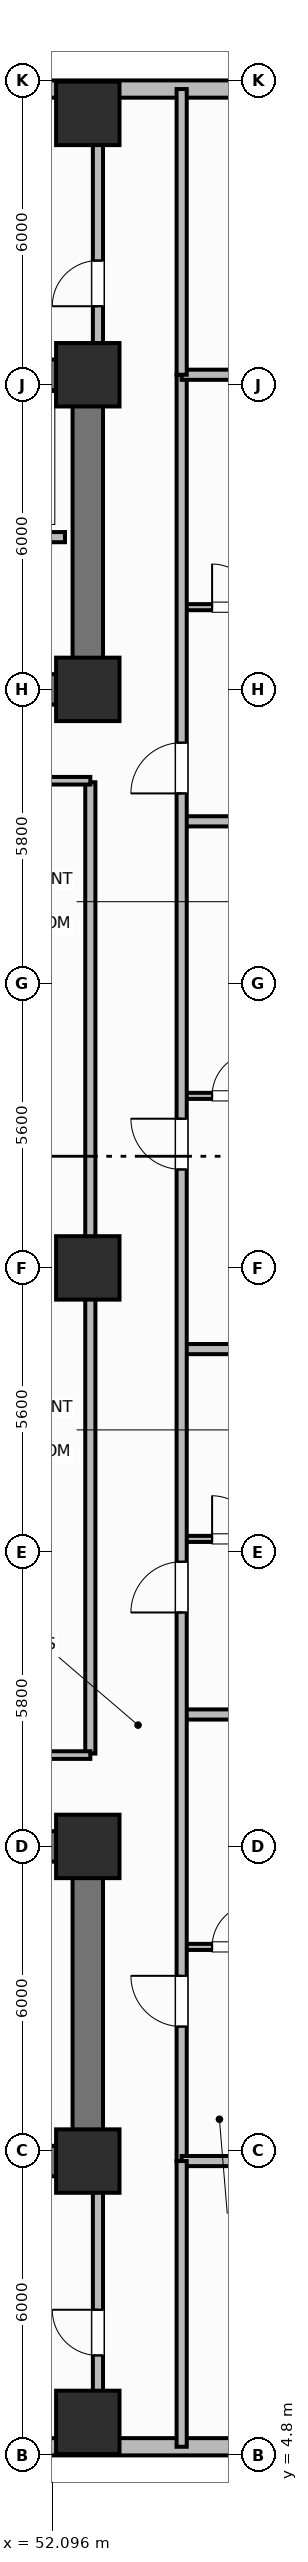
"""IFC4 building model, lengths in metres.
Left out: names, types, materials, properties, quantities, classifications, styles, units other than length and angle.
Written with IfcOpenShell. Run it as: python <this file> out.ifc"""

import sys

from ifc_helpers import new_model, si_unit, direction, frame, frame_2d, origin, origin_2d, place, context, subcontext, project, spatial, rectangle, extrude, element, fill, save


model = new_model("IFC4")
c1 = context("Model", 3, precision=1e-05, world=origin(), true_north=direction((0.0, 1.0)))
c2 = subcontext(c1, "Body", "Model", "MODEL_VIEW")
j1 = project(units=[si_unit("LENGTHUNIT", "METRE"), si_unit("PLANEANGLEUNIT", "RADIAN")], contexts=[c1])
p1 = place(None, origin())
s1 = spatial("IfcSite", under=j1, at=p1, CompositionType="ELEMENT")
p2 = place(p1, origin())
s2 = spatial("IfcBuilding", under=s1, at=p2, CompositionType="ELEMENT")
p3 = place(p2, frame((0.0, 0.0, 65.8)))
s3 = spatial("IfcBuildingStorey", under=s2, at=p3, CompositionType="ELEMENT", Elevation=65.8)
p4 = place(p3, frame((52.8, 10.6, 0.0), z_axis=(0.0, 0.0, 1.0), x_axis=(-1.0, 0.0, 0.0)))
e1 = element("IfcWall", 1, at=p4, inside=s3, PredefinedType="SHEAR", context=c2, shape_type="SweptSolid", body=[
    extrude(rectangle(XDim=27.2, YDim=0.6, at=frame_2d((13.6, 0.0))), origin(), (0.0, 0.0, 1.0), 3.7),
])
p5 = place(p3, frame((52.8, 10.9, 0.0), z_axis=(0.0, 0.0, 1.0), x_axis=(0.0, 1.0, 0.0)))
e2 = element("IfcWall", 2, at=p5, inside=s3, PredefinedType="SHEAR", context=c2, shape_type="SweptSolid", body=[
    extrude(rectangle(XDim=5.6, YDim=0.6, at=frame_2d((2.8, 0.0))), origin(), (0.0, 0.0, 1.0), 3.7),
])
p6 = place(p3, frame((25.6, 16.8, 0.0), z_axis=(0.0, 0.0, 1.0), x_axis=(1.0, 0.0, 0.0)))
e3 = element("IfcWall", 3, at=p6, inside=s3, PredefinedType="SHEAR", context=c2, shape_type="SweptSolid", body=[
    extrude(rectangle(XDim=27.2, YDim=0.6, at=frame_2d((13.6, 0.0))), origin(), (0.0, 0.0, 1.0), 3.7),
])
p7 = place(p6, frame((1.9, 0.0, 0.0)))
e4 = element("IfcOpeningElement", 4, at=p7, cuts=e3, PredefinedType="OPENING", context=c2, shape_type="SweptSolid", body=[
    extrude(rectangle(XDim=1.1, YDim=2.15, at=frame_2d((0.55, 1.075))), frame((0.0, 0.31, 0.0), z_axis=(0.0, -1.0, 0.0), x_axis=(1.0, 0.0, 0.0)), (0.0, 0.0, 1.0), 0.62),
])
p8 = place(p6, frame((13.0, 0.0, 0.0)))
e5 = element("IfcOpeningElement", 5, at=p8, cuts=e3, PredefinedType="OPENING", context=c2, shape_type="SweptSolid", body=[
    extrude(rectangle(XDim=1.2, YDim=2.15, at=frame_2d((0.6, 1.075))), frame((0.0, 0.31, 0.0), z_axis=(0.0, -1.0, 0.0), x_axis=(1.0, 0.0, 0.0)), (0.0, 0.0, 1.0), 0.62),
])
p9 = place(p6, frame((20.4, 0.0, 0.0)))
e6 = element("IfcOpeningElement", 6, at=p9, cuts=e3, PredefinedType="OPENING", context=c2, shape_type="SweptSolid", body=[
    extrude(rectangle(XDim=1.3, YDim=2.2, at=frame_2d((0.65, 1.1))), frame((0.0, 0.31, 0.0), z_axis=(0.0, -1.0, 0.0), x_axis=(1.0, 0.0, 0.0)), (0.0, 0.0, 1.0), 0.62),
])
p10 = place(p6, frame((24.65, 0.0, 0.0)))
e7 = element("IfcOpeningElement", 7, at=p10, cuts=e3, PredefinedType="OPENING", context=c2, shape_type="SweptSolid", body=[
    extrude(rectangle(XDim=0.85, YDim=2.1, at=frame_2d((0.425, 1.05))), frame((0.0, 0.31, 0.0), z_axis=(0.0, -1.0, 0.0), x_axis=(1.0, 0.0, 0.0)), (0.0, 0.0, 1.0), 0.62),
])
p11 = place(p3, frame((25.6, 45.8, 0.0), z_axis=(0.0, 0.0, 1.0), x_axis=(1.0, 0.0, 0.0)))
e8 = element("IfcWall", 8, at=p11, inside=s3, PredefinedType="SHEAR", context=c2, shape_type="SweptSolid", body=[
    extrude(rectangle(XDim=27.2, YDim=0.6, at=frame_2d((13.6, 0.0))), origin(), (0.0, 0.0, 1.0), 3.7),
])
p12 = place(p3, frame((52.8, 39.9, 0.0), z_axis=(0.0, 0.0, 1.0), x_axis=(0.0, 1.0, 0.0)))
e9 = element("IfcWall", 9, at=p12, inside=s3, PredefinedType="SHEAR", context=c2, shape_type="SweptSolid", body=[
    extrude(rectangle(XDim=5.6, YDim=0.6, at=frame_2d((2.8, 0.0))), origin(), (0.0, 0.0, 1.0), 3.7),
])
p13 = place(p3, frame((52.8, 39.6, 0.0), z_axis=(0.0, 0.0, 1.0), x_axis=(-1.0, 0.0, 0.0)))
e10 = element("IfcWall", 10, at=p13, inside=s3, PredefinedType="SHEAR", context=c2, shape_type="SweptSolid", body=[
    extrude(rectangle(XDim=27.2, YDim=0.6, at=frame_2d((13.6, 0.0))), origin(), (0.0, 0.0, 1.0), 3.7),
])
p14 = place(p13, frame((24.2, 0.0, 0.0)))
e11 = element("IfcOpeningElement", 11, at=p14, cuts=e10, PredefinedType="OPENING", context=c2, shape_type="SweptSolid", body=[
    extrude(rectangle(XDim=1.1, YDim=2.15, at=frame_2d((0.55, 1.075))), frame((0.0, 0.31, 0.0), z_axis=(0.0, -1.0, 0.0), x_axis=(1.0, 0.0, 0.0)), (0.0, 0.0, 1.0), 0.62),
])
p15 = place(p13, frame((15.1, 0.0, 0.0)))
e12 = element("IfcOpeningElement", 12, at=p15, cuts=e10, PredefinedType="OPENING", context=c2, shape_type="SweptSolid", body=[
    extrude(rectangle(XDim=1.2, YDim=2.15, at=frame_2d((0.6, 1.075))), frame((0.0, 0.31, 0.0), z_axis=(0.0, -1.0, 0.0), x_axis=(1.0, 0.0, 0.0)), (0.0, 0.0, 1.0), 0.62),
])
p16 = place(p13, frame((11.6, 0.0, 0.0)))
e13 = element("IfcOpeningElement", 13, at=p16, cuts=e10, PredefinedType="OPENING", context=c2, shape_type="SweptSolid", body=[
    extrude(rectangle(XDim=0.9, YDim=2.1, at=frame_2d((0.45, 1.05))), frame((0.0, 0.31, 0.0), z_axis=(0.0, -1.0, 0.0), x_axis=(1.0, 0.0, 0.0)), (0.0, 0.0, 1.0), 0.62),
])
p17 = place(p13, frame((3.6, 0.0, 0.0)))
e14 = element("IfcOpeningElement", 14, at=p17, cuts=e10, PredefinedType="OPENING", context=c2, shape_type="SweptSolid", body=[
    extrude(rectangle(XDim=1.0, YDim=2.15, at=frame_2d((0.5, 1.075))), frame((0.0, 0.31, 0.0), z_axis=(0.0, -1.0, 0.0), x_axis=(1.0, 0.0, 0.0)), (0.0, 0.0, 1.0), 0.62),
])
for number, where, z_axis, x_axis in (
    (15, (52.8, 10.6, 0.0), (0.0, 0.0, 1.0), (1.0, 0.0, 0.0)),
    (16, (52.8, 16.8, 0.0), (0.0, 0.0, 1.0), (1.0, 0.0, 0.0)),
    (17, (52.8, 39.6, 0.0), (0.0, 0.0, 1.0), (1.0, 0.0, 0.0)),
    (18, (52.8, 45.8, 0.0), (0.0, 0.0, 1.0), (1.0, 0.0, 0.0)),
    (19, (52.8, 28.2, 0.0), (0.0, 0.0, 1.0), (1.0, 0.0, 0.0)),
    (20, (52.8, 5.45, 0.0), (0.0, 0.0, 1.0), (1.0, 0.0, 0.0)),
    (21, (52.8, 50.95, 0.0), (0.0, 0.0, 1.0), (1.0, 0.0, 0.0)),
):
    element("IfcColumn", number, at=place(p3, frame(where, z_axis=z_axis, x_axis=x_axis)), inside=s3, PredefinedType="COLUMN", context=c2, shape_type="SweptSolid", body=[
        extrude(rectangle(XDim=1.25, YDim=1.25, at=origin_2d()), origin(), (0.0, 0.0, 1.0), 3.7),
    ])
p18 = place(p3, frame((42.4, 4.97, 0.0), z_axis=(0.0, 0.0, 1.0), x_axis=(1.0, 0.0, 0.0)))
e22 = element("IfcWall", 22, at=p18, inside=s3, PredefinedType="SOLIDWALL", context=c2, shape_type="SweptSolid", body=[
    extrude(rectangle(XDim=17.4, YDim=0.34, at=frame_2d((8.7, 0.0))), origin(), (0.0, 0.0, 1.0), 2.7),
])
p19 = place(p18, frame((2.16, 0.0, 0.68)))
e23 = element("IfcOpeningElement", 23, at=p19, cuts=e22, PredefinedType="OPENING", context=c2, shape_type="SweptSolid", body=[
    extrude(rectangle(XDim=1.6, YDim=1.9, at=frame_2d((0.8, 0.95))), frame((0.0, 0.18, 0.0), z_axis=(0.0, -1.0, 0.0), x_axis=(1.0, 0.0, 0.0)), (0.0, 0.0, 1.0), 0.36),
])
p20 = place(p18, frame((5.03, 0.0, 0.68)))
e24 = element("IfcOpeningElement", 24, at=p20, cuts=e22, PredefinedType="OPENING", context=c2, shape_type="SweptSolid", body=[
    extrude(rectangle(XDim=1.6, YDim=1.9, at=frame_2d((0.8, 0.95))), frame((0.0, 0.18, 0.0), z_axis=(0.0, -1.0, 0.0), x_axis=(1.0, 0.0, 0.0)), (0.0, 0.0, 1.0), 0.36),
])
p21 = place(p18, frame((7.55, 0.0, 0.68)))
e25 = element("IfcOpeningElement", 25, at=p21, cuts=e22, PredefinedType="OPENING", context=c2, shape_type="SweptSolid", body=[
    extrude(rectangle(XDim=1.6, YDim=1.9, at=frame_2d((0.8, 0.95))), frame((0.0, 0.18, 0.0), z_axis=(0.0, -1.0, 0.0), x_axis=(1.0, 0.0, 0.0)), (0.0, 0.0, 1.0), 0.36),
])
p22 = place(p18, frame((14.34, 0.0, 0.68)))
e26 = element("IfcOpeningElement", 26, at=p22, cuts=e22, PredefinedType="OPENING", context=c2, shape_type="SweptSolid", body=[
    extrude(rectangle(XDim=1.6, YDim=1.9, at=frame_2d((0.8, 0.95))), frame((0.0, 0.18, 0.0), z_axis=(0.0, -1.0, 0.0), x_axis=(1.0, 0.0, 0.0)), (0.0, 0.0, 1.0), 0.36),
])
p23 = place(p3, frame((59.8, 51.43, 0.0), z_axis=(0.0, 0.0, 1.0), x_axis=(-1.0, 0.0, 0.0)))
e27 = element("IfcWall", 27, at=p23, inside=s3, PredefinedType="SOLIDWALL", context=c2, shape_type="SweptSolid", body=[
    extrude(rectangle(XDim=17.4, YDim=0.34, at=frame_2d((8.7, 0.0))), origin(), (0.0, 0.0, 1.0), 2.7),
])
p24 = place(p23, frame((1.613, 0.0, 0.68)))
e28 = element("IfcOpeningElement", 28, at=p24, cuts=e27, PredefinedType="OPENING", context=c2, shape_type="SweptSolid", body=[
    extrude(rectangle(XDim=2.1, YDim=1.9, at=frame_2d((1.05, 0.95))), frame((0.0, 0.18, 0.0), z_axis=(0.0, -1.0, 0.0), x_axis=(1.0, 0.0, 0.0)), (0.0, 0.0, 1.0), 0.36),
])
p25 = place(p23, frame((9.663, 0.0, 0.68)))
e29 = element("IfcOpeningElement", 29, at=p25, cuts=e27, PredefinedType="OPENING", context=c2, shape_type="SweptSolid", body=[
    extrude(rectangle(XDim=2.1, YDim=1.9, at=frame_2d((1.05, 0.95))), frame((0.0, 0.18, 0.0), z_axis=(0.0, -1.0, 0.0), x_axis=(1.0, 0.0, 0.0)), (0.0, 0.0, 1.0), 0.36),
])
p26 = place(p23, frame((12.988, 0.0, 0.68)))
e30 = element("IfcOpeningElement", 30, at=p26, cuts=e27, PredefinedType="OPENING", context=c2, shape_type="SweptSolid", body=[
    extrude(rectangle(XDim=2.1, YDim=1.9, at=frame_2d((1.05, 0.95))), frame((0.0, 0.18, 0.0), z_axis=(0.0, -1.0, 0.0), x_axis=(1.0, 0.0, 0.0)), (0.0, 0.0, 1.0), 0.36),
])
p27 = place(p3, frame((52.35, 42.6, 0.0), z_axis=(0.0, 0.0, 1.0), x_axis=(-1.0, 0.0, 0.0)))
e31 = element("IfcWall", 31, at=p27, inside=s3, PredefinedType="PARTITIONING", context=c2, shape_type="SweptSolid", body=[
    extrude(rectangle(XDim=8.8, YDim=0.2, at=frame_2d((4.4, 0.0))), origin(), (0.0, 0.0, 1.0), 2.53),
])
p28 = place(p3, frame((52.85, 18.63, 0.0), z_axis=(0.0, 0.0, 1.0), x_axis=(0.0, 1.0, 0.0)))
e32 = element("IfcWall", 32, at=p28, inside=s3, PredefinedType="PARTITIONING", context=c2, shape_type="SweptSolid", body=[
    extrude(rectangle(XDim=19.14, YDim=0.2, at=frame_2d((9.57, 0.0))), origin(), (0.0, 0.0, 1.0), 2.53),
])
for number, where, z_axis, x_axis in (
    (33, (42.75, 18.6, 0.0), (0.0, 0.0, 1.0), (1.0, 0.0, 0.0)),
    (34, (42.75, 37.8, 0.0), (0.0, 0.0, 1.0), (1.0, 0.0, 0.0)),
):
    element("IfcWall", number, at=place(p3, frame(where, z_axis=z_axis, x_axis=x_axis)), inside=s3, PredefinedType="PARTITIONING", context=c2, shape_type="SweptSolid", body=[
        extrude(rectangle(XDim=10.1, YDim=0.15, at=frame_2d((5.05, 0.0))), origin(), (0.0, 0.0, 1.0), 2.53),
    ])
p29 = place(p3, frame((54.65, 14.82, 0.0), z_axis=(0.0, 0.0, 1.0), x_axis=(1.0, 0.0, 0.0)))
e35 = element("IfcWall", 35, at=p29, inside=s3, PredefinedType="PARTITIONING", context=c2, shape_type="SweptSolid", body=[
    extrude(rectangle(XDim=2.25, YDim=0.12, at=frame_2d((1.125, 0.0))), origin(), (0.0, 0.0, 1.0), 2.53),
])
p30 = place(p29, frame((0.6, 0.0, 0.0)))
e36 = element("IfcOpeningElement", 36, at=p30, cuts=e35, PredefinedType="OPENING", context=c2, shape_type="SweptSolid", body=[
    extrude(rectangle(XDim=0.85, YDim=2.1, at=frame_2d((0.425, 1.05))), frame((0.0, 0.07, 0.0), z_axis=(0.0, -1.0, 0.0), x_axis=(1.0, 0.0, 0.0)), (0.0, 0.0, 1.0), 0.14),
])
p31 = place(p3, frame((54.65, 19.4, 0.0), z_axis=(0.0, 0.0, 1.0), x_axis=(1.0, 0.0, 0.0)))
e37 = element("IfcWall", 37, at=p31, inside=s3, PredefinedType="PARTITIONING", context=c2, shape_type="SweptSolid", body=[
    extrude(rectangle(XDim=9.18, YDim=0.2, at=frame_2d((4.59, 0.0))), origin(), (0.0, 0.0, 1.0), 2.53),
])
p32 = place(p3, frame((54.65, 22.86, 0.0), z_axis=(0.0, 0.0, 1.0), x_axis=(1.0, 0.0, 0.0)))
e38 = element("IfcWall", 38, at=p32, inside=s3, PredefinedType="PARTITIONING", context=c2, shape_type="SweptSolid", body=[
    extrude(rectangle(XDim=2.25, YDim=0.12, at=frame_2d((1.125, 0.0))), origin(), (0.0, 0.0, 1.0), 2.53),
])
p33 = place(p32, frame((0.6, 0.0, 0.0)))
e39 = element("IfcOpeningElement", 39, at=p33, cuts=e38, PredefinedType="OPENING", context=c2, shape_type="SweptSolid", body=[
    extrude(rectangle(XDim=0.85, YDim=2.1, at=frame_2d((0.425, 1.05))), frame((0.0, 0.07, 0.0), z_axis=(0.0, -1.0, 0.0), x_axis=(1.0, 0.0, 0.0)), (0.0, 0.0, 1.0), 0.14),
])
p34 = place(p3, frame((54.65, 26.6, 0.0), z_axis=(0.0, 0.0, 1.0), x_axis=(1.0, 0.0, 0.0)))
e40 = element("IfcWall", 40, at=p34, inside=s3, PredefinedType="PARTITIONING", context=c2, shape_type="SweptSolid", body=[
    extrude(rectangle(XDim=8.78, YDim=0.2, at=frame_2d((4.39, 0.0))), origin(), (0.0, 0.0, 1.0), 2.53),
])
p35 = place(p3, frame((54.65, 31.59, 0.0), z_axis=(0.0, 0.0, 1.0), x_axis=(1.0, 0.0, 0.0)))
e41 = element("IfcWall", 41, at=p35, inside=s3, PredefinedType="PARTITIONING", context=c2, shape_type="SweptSolid", body=[
    extrude(rectangle(XDim=2.25, YDim=0.12, at=frame_2d((1.125, 0.0))), origin(), (0.0, 0.0, 1.0), 2.53),
])
p36 = place(p35, frame((0.6, 0.0, 0.0)))
e42 = element("IfcOpeningElement", 42, at=p36, cuts=e41, PredefinedType="OPENING", context=c2, shape_type="SweptSolid", body=[
    extrude(rectangle(XDim=0.85, YDim=2.1, at=frame_2d((0.425, 1.05))), frame((0.0, 0.07, 0.0), z_axis=(0.0, -1.0, 0.0), x_axis=(1.0, 0.0, 0.0)), (0.0, 0.0, 1.0), 0.14),
])
p37 = place(p3, frame((54.65, 37.0, 0.0), z_axis=(0.0, 0.0, 1.0), x_axis=(1.0, 0.0, 0.0)))
e43 = element("IfcWall", 43, at=p37, inside=s3, PredefinedType="PARTITIONING", context=c2, shape_type="SweptSolid", body=[
    extrude(rectangle(XDim=9.18, YDim=0.2, at=frame_2d((4.59, 0.0))), origin(), (0.0, 0.0, 1.0), 2.53),
])
p38 = place(p3, frame((54.65, 41.22, 0.0), z_axis=(0.0, 0.0, 1.0), x_axis=(1.0, 0.0, 0.0)))
e44 = element("IfcWall", 44, at=p38, inside=s3, PredefinedType="PARTITIONING", context=c2, shape_type="SweptSolid", body=[
    extrude(rectangle(XDim=2.25, YDim=0.12, at=frame_2d((1.125, 0.0))), origin(), (0.0, 0.0, 1.0), 2.53),
])
p39 = place(p38, frame((0.6, 0.0, 0.0)))
e45 = element("IfcOpeningElement", 45, at=p39, cuts=e44, PredefinedType="OPENING", context=c2, shape_type="SweptSolid", body=[
    extrude(rectangle(XDim=0.85, YDim=2.1, at=frame_2d((0.425, 1.05))), frame((0.0, 0.07, 0.0), z_axis=(0.0, -1.0, 0.0), x_axis=(1.0, 0.0, 0.0)), (0.0, 0.0, 1.0), 0.14),
])
p40 = place(p3, frame((54.65, 10.6, 0.0), z_axis=(0.0, 0.0, 1.0), x_axis=(0.0, 1.0, 0.0)))
e46 = element("IfcWall", 46, at=p40, inside=s3, PredefinedType="PARTITIONING", context=c2, shape_type="SweptSolid", body=[
    extrude(rectangle(XDim=35.2, YDim=0.2, at=frame_2d((17.6, 0.0))), origin(), (0.0, 0.0, 1.0), 2.53),
])
p41 = place(p40, frame((2.65, 0.0, 0.0)))
e47 = element("IfcOpeningElement", 47, at=p41, cuts=e46, PredefinedType="OPENING", context=c2, shape_type="SweptSolid", body=[
    extrude(rectangle(XDim=1.0, YDim=2.15, at=frame_2d((0.5, 1.075))), frame((0.0, 0.11, 0.0), z_axis=(0.0, -1.0, 0.0), x_axis=(1.0, 0.0, 0.0)), (0.0, 0.0, 1.0), 0.22),
])
p42 = place(p40, frame((10.81, 0.0, 0.0)))
e48 = element("IfcOpeningElement", 48, at=p42, cuts=e46, PredefinedType="OPENING", context=c2, shape_type="SweptSolid", body=[
    extrude(rectangle(XDim=1.0, YDim=2.15, at=frame_2d((0.5, 1.075))), frame((0.0, 0.11, 0.0), z_axis=(0.0, -1.0, 0.0), x_axis=(1.0, 0.0, 0.0)), (0.0, 0.0, 1.0), 0.22),
])
p43 = place(p40, frame((19.54, 0.0, 0.0)))
e49 = element("IfcOpeningElement", 49, at=p43, cuts=e46, PredefinedType="OPENING", context=c2, shape_type="SweptSolid", body=[
    extrude(rectangle(XDim=1.0, YDim=2.15, at=frame_2d((0.5, 1.075))), frame((0.0, 0.11, 0.0), z_axis=(0.0, -1.0, 0.0), x_axis=(1.0, 0.0, 0.0)), (0.0, 0.0, 1.0), 0.22),
])
p44 = place(p40, frame((26.95, 0.0, 0.0)))
e50 = element("IfcOpeningElement", 50, at=p44, cuts=e46, PredefinedType="OPENING", context=c2, shape_type="SweptSolid", body=[
    extrude(rectangle(XDim=1.0, YDim=2.15, at=frame_2d((0.5, 1.075))), frame((0.0, 0.11, 0.0), z_axis=(0.0, -1.0, 0.0), x_axis=(1.0, 0.0, 0.0)), (0.0, 0.0, 1.0), 0.22),
])
for number, where, z_axis, x_axis in (
    (51, (54.65, 10.6, 0.0), (0.0, 0.0, 1.0), (1.0, 0.0, 0.0)),
    (52, (54.65, 45.8, 0.0), (0.0, 0.0, 1.0), (1.0, 0.0, 0.0)),
):
    element("IfcWall", number, at=place(p3, frame(where, z_axis=z_axis, x_axis=x_axis)), inside=s3, PredefinedType="PARTITIONING", context=c2, shape_type="SweptSolid", body=[
        extrude(rectangle(XDim=8.76, YDim=0.2, at=frame_2d((4.38, 0.0))), origin(), (0.0, 0.0, 1.0), 2.53),
    ])
p45 = place(p3, frame((54.65, 4.97, 0.0), z_axis=(0.0, 0.0, 1.0), x_axis=(0.0, 1.0, 0.0)))
e53 = element("IfcWall", 53, at=p45, inside=s3, PredefinedType="PARTITIONING", context=c2, shape_type="SweptSolid", body=[
    extrude(rectangle(XDim=5.63, YDim=0.2, at=frame_2d((2.815, 0.0))), origin(), (0.0, 0.0, 1.0), 2.53),
])
p46 = place(p3, frame((54.65, 45.8, 0.0), z_axis=(0.0, 0.0, 1.0), x_axis=(0.0, 1.0, 0.0)))
e54 = element("IfcWall", 54, at=p46, inside=s3, PredefinedType="PARTITIONING", context=c2, shape_type="SweptSolid", body=[
    extrude(rectangle(XDim=5.63, YDim=0.2, at=frame_2d((2.815, 0.0))), origin(), (0.0, 0.0, 1.0), 2.53),
])
p47 = place(p3, frame((53.0, 5.72, 0.0), z_axis=(0.0, 0.0, 1.0), x_axis=(0.0, 1.0, 0.0)))
e55 = element("IfcWall", 55, at=p47, inside=s3, PredefinedType="PARTITIONING", context=c2, shape_type="SweptSolid", body=[
    extrude(rectangle(XDim=4.58, YDim=0.2, at=frame_2d((2.29, 0.0))), origin(), (0.0, 0.0, 1.0), 2.53),
])
p48 = place(p47, frame((1.05, 0.0, 0.0)))
e56 = element("IfcOpeningElement", 56, at=p48, cuts=e55, PredefinedType="OPENING", context=c2, shape_type="SweptSolid", body=[
    extrude(rectangle(XDim=0.9, YDim=2.1, at=frame_2d((0.45, 1.05))), frame((0.0, 0.11, 0.0), z_axis=(0.0, -1.0, 0.0), x_axis=(1.0, 0.0, 0.0)), (0.0, 0.0, 1.0), 0.22),
])
p49 = place(p3, frame((53.0, 46.1, 0.0), z_axis=(0.0, 0.0, 1.0), x_axis=(0.0, 1.0, 0.0)))
e57 = element("IfcWall", 57, at=p49, inside=s3, PredefinedType="PARTITIONING", context=c2, shape_type="SweptSolid", body=[
    extrude(rectangle(XDim=4.58, YDim=0.2, at=frame_2d((2.29, 0.0))), origin(), (0.0, 0.0, 1.0), 2.53),
])
p50 = place(p49, frame((1.05, 0.0, 0.0)))
e58 = element("IfcOpeningElement", 58, at=p50, cuts=e57, PredefinedType="OPENING", context=c2, shape_type="SweptSolid", body=[
    extrude(rectangle(XDim=0.9, YDim=2.1, at=frame_2d((0.45, 1.05))), frame((0.0, 0.11, 0.0), z_axis=(0.0, -1.0, 0.0), x_axis=(1.0, 0.0, 0.0)), (0.0, 0.0, 1.0), 0.22),
])
p51 = place(p30, origin())
e59 = element("IfcDoor", 59, at=p51, inside=s3, OperationType="SINGLE_SWING_RIGHT", PredefinedType="DOOR", context=c2, shape_type="SweptSolid", body=[
    extrude(rectangle(XDim=0.85, YDim=2.1, at=frame_2d((0.425, 1.05))), frame((0.0, 0.025, 0.0), z_axis=(0.0, -1.0, 0.0), x_axis=(1.0, 0.0, 0.0)), (0.0, 0.0, 1.0), 0.05),
])
fill(e36, e59)
p52 = place(p33, origin())
e60 = element("IfcDoor", 60, at=p52, inside=s3, OperationType="SINGLE_SWING_LEFT", PredefinedType="DOOR", context=c2, shape_type="SweptSolid", body=[
    extrude(rectangle(XDim=0.85, YDim=2.1, at=frame_2d((0.425, 1.05))), frame((0.0, 0.025, 0.0), z_axis=(0.0, -1.0, 0.0), x_axis=(1.0, 0.0, 0.0)), (0.0, 0.0, 1.0), 0.05),
])
fill(e39, e60)
p53 = place(p36, origin())
e61 = element("IfcDoor", 61, at=p53, inside=s3, OperationType="SINGLE_SWING_RIGHT", PredefinedType="DOOR", context=c2, shape_type="SweptSolid", body=[
    extrude(rectangle(XDim=0.85, YDim=2.1, at=frame_2d((0.425, 1.05))), frame((0.0, 0.025, 0.0), z_axis=(0.0, -1.0, 0.0), x_axis=(1.0, 0.0, 0.0)), (0.0, 0.0, 1.0), 0.05),
])
fill(e42, e61)
p54 = place(p39, origin())
e62 = element("IfcDoor", 62, at=p54, inside=s3, OperationType="SINGLE_SWING_LEFT", PredefinedType="DOOR", context=c2, shape_type="SweptSolid", body=[
    extrude(rectangle(XDim=0.85, YDim=2.1, at=frame_2d((0.425, 1.05))), frame((0.0, 0.025, 0.0), z_axis=(0.0, -1.0, 0.0), x_axis=(1.0, 0.0, 0.0)), (0.0, 0.0, 1.0), 0.05),
])
fill(e45, e62)
p55 = place(p41, origin())
e63 = element("IfcDoor", 63, at=p55, inside=s3, OperationType="SINGLE_SWING_RIGHT", PredefinedType="DOOR", context=c2, shape_type="SweptSolid", body=[
    extrude(rectangle(XDim=1.0, YDim=2.15, at=frame_2d((0.5, 1.075))), frame((0.0, 0.025, 0.0), z_axis=(0.0, -1.0, 0.0), x_axis=(1.0, 0.0, 0.0)), (0.0, 0.0, 1.0), 0.05),
])
fill(e47, e63)
p56 = place(p42, origin())
e64 = element("IfcDoor", 64, at=p56, inside=s3, OperationType="SINGLE_SWING_LEFT", PredefinedType="DOOR", context=c2, shape_type="SweptSolid", body=[
    extrude(rectangle(XDim=1.0, YDim=2.15, at=frame_2d((0.5, 1.075))), frame((0.0, 0.025, 0.0), z_axis=(0.0, -1.0, 0.0), x_axis=(1.0, 0.0, 0.0)), (0.0, 0.0, 1.0), 0.05),
])
fill(e48, e64)
p57 = place(p43, origin())
e65 = element("IfcDoor", 65, at=p57, inside=s3, OperationType="SINGLE_SWING_RIGHT", PredefinedType="DOOR", context=c2, shape_type="SweptSolid", body=[
    extrude(rectangle(XDim=1.0, YDim=2.15, at=frame_2d((0.5, 1.075))), frame((0.0, 0.025, 0.0), z_axis=(0.0, -1.0, 0.0), x_axis=(1.0, 0.0, 0.0)), (0.0, 0.0, 1.0), 0.05),
])
fill(e49, e65)
p58 = place(p44, origin())
e66 = element("IfcDoor", 66, at=p58, inside=s3, OperationType="SINGLE_SWING_LEFT", PredefinedType="DOOR", context=c2, shape_type="SweptSolid", body=[
    extrude(rectangle(XDim=1.0, YDim=2.15, at=frame_2d((0.5, 1.075))), frame((0.0, 0.025, 0.0), z_axis=(0.0, -1.0, 0.0), x_axis=(1.0, 0.0, 0.0)), (0.0, 0.0, 1.0), 0.05),
])
fill(e50, e66)
p59 = place(p48, origin())
e67 = element("IfcDoor", 67, at=p59, inside=s3, OperationType="SINGLE_SWING_RIGHT", PredefinedType="DOOR", context=c2, shape_type="SweptSolid", body=[
    extrude(rectangle(XDim=0.9, YDim=2.1, at=frame_2d((0.45, 1.05))), frame((0.0, 0.025, 0.0), z_axis=(0.0, -1.0, 0.0), x_axis=(1.0, 0.0, 0.0)), (0.0, 0.0, 1.0), 0.05),
])
fill(e56, e67)
p60 = place(p50, origin())
e68 = element("IfcDoor", 68, at=p60, inside=s3, OperationType="SINGLE_SWING_LEFT", PredefinedType="DOOR", context=c2, shape_type="SweptSolid", body=[
    extrude(rectangle(XDim=0.9, YDim=2.1, at=frame_2d((0.45, 1.05))), frame((0.0, 0.025, 0.0), z_axis=(0.0, -1.0, 0.0), x_axis=(1.0, 0.0, 0.0)), (0.0, 0.0, 1.0), 0.05),
])
fill(e58, e68)
save(model, sys.argv[1])
